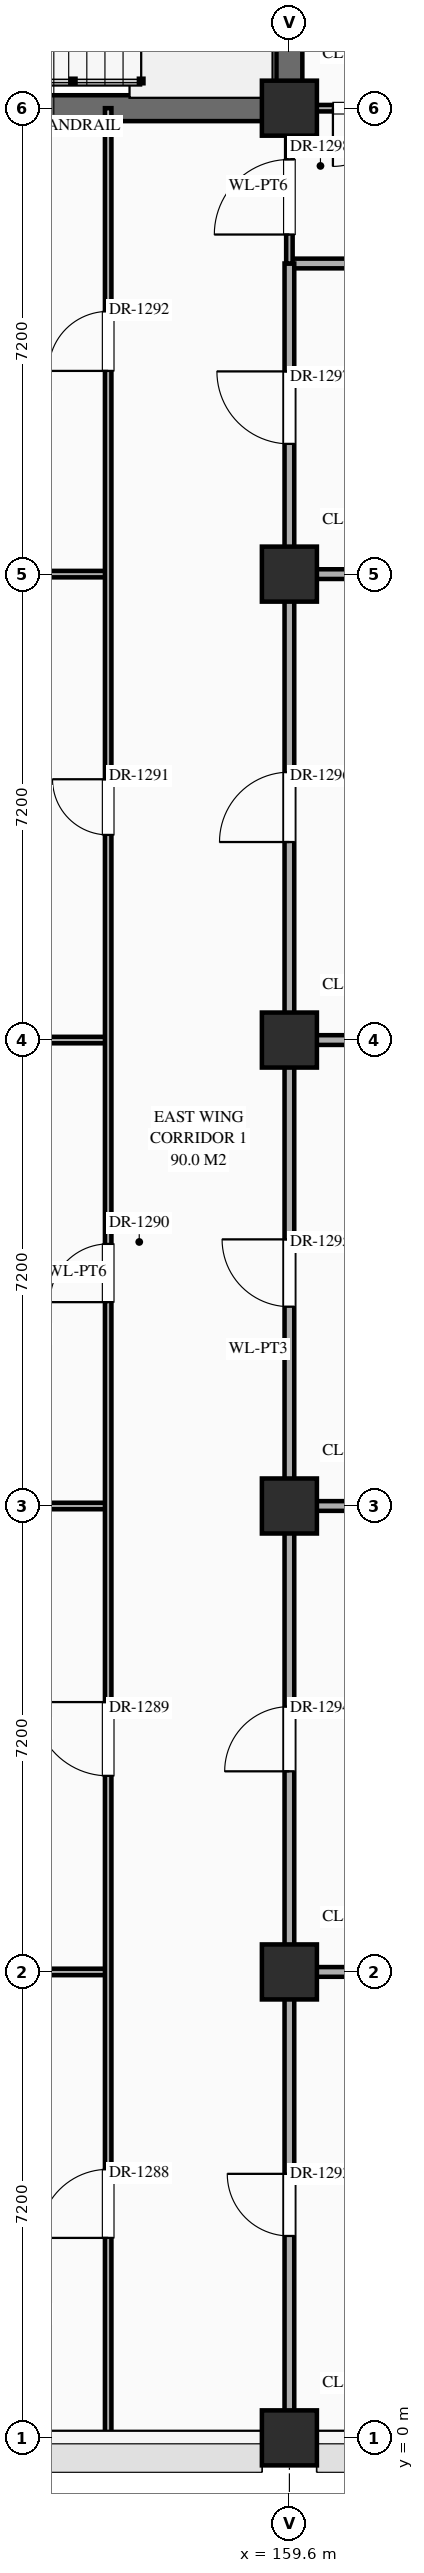
"""IFC4 building model, lengths in metres.
Left out: names, types, materials, properties, quantities, classifications, styles, units other than length and angle.
Written with IfcOpenShell. Run it as: python <this file> out.ifc"""

import sys

from ifc_helpers import new_model, si_unit, direction, frame, frame_2d, origin, origin_2d, place, context, subcontext, project, spatial, rectangle, extrude, element, fill, save


model = new_model("IFC4")
c1 = context("Model", 3, precision=1e-05, world=origin(), true_north=direction((0.0, 1.0)))
c2 = subcontext(c1, "Body", "Model", "MODEL_VIEW")
j1 = project(units=[si_unit("LENGTHUNIT", "METRE"), si_unit("PLANEANGLEUNIT", "RADIAN")], contexts=[c1])
p1 = place(None, origin())
s1 = spatial("IfcSite", under=j1, at=p1, CompositionType="ELEMENT")
p2 = place(p1, origin())
s2 = spatial("IfcBuilding", under=s1, at=p2, CompositionType="ELEMENT")
p3 = place(p2, frame((0.0, 0.0, 5.4)))
s3 = spatial("IfcBuildingStorey", under=s2, at=p3, CompositionType="ELEMENT", Elevation=5.4)
for number, where, z_axis, x_axis in (
    (1, (159.6, 0.0, 0.0), (0.0, 0.0, 1.0), (1.0, 0.0, 0.0)),
    (2, (159.6, 7.2, 0.0), (0.0, 0.0, 1.0), (1.0, 0.0, 0.0)),
    (3, (159.6, 14.4, 0.0), (0.0, 0.0, 1.0), (1.0, 0.0, 0.0)),
    (4, (159.6, 21.6, 0.0), (0.0, 0.0, 1.0), (1.0, 0.0, 0.0)),
    (5, (159.6, 28.8, 0.0), (0.0, 0.0, 1.0), (1.0, 0.0, 0.0)),
    (6, (159.6, 36.0, 0.0), (0.0, 0.0, 1.0), (1.0, 0.0, 0.0)),
):
    element("IfcColumn", number, at=place(p3, frame(where, z_axis=z_axis, x_axis=x_axis)), inside=s3, PredefinedType="COLUMN", context=c2, shape_type="SweptSolid", body=[
        extrude(rectangle(XDim=0.85, YDim=0.85, at=origin_2d()), origin(), (0.0, 0.0, 1.0), 5.4),
    ])
p4 = place(p3, frame((151.24, 7.2, 0.0), z_axis=(0.0, 0.0, 1.0), x_axis=(1.0, 0.0, 0.0)))
e7 = element("IfcWall", 7, at=p4, inside=s3, PredefinedType="STANDARD", context=c2, shape_type="SweptSolid", body=[
    extrude(rectangle(XDim=5.56, YDim=0.1, at=frame_2d((2.78, 0.0))), origin(), (0.0, 0.0, 1.0), 4.2),
])
p5 = place(p3, frame((159.6, 7.2, 0.0), z_axis=(0.0, 0.0, 1.0), x_axis=(1.0, 0.0, 0.0)))
e8 = element("IfcWall", 8, at=p5, inside=s3, PredefinedType="STANDARD", context=c2, shape_type="SweptSolid", body=[
    extrude(rectangle(XDim=8.36, YDim=0.15, at=frame_2d((4.18, 0.0))), origin(), (0.0, 0.0, 1.0), 4.2),
])
p6 = place(p3, frame((151.24, 14.4, 0.0), z_axis=(0.0, 0.0, 1.0), x_axis=(1.0, 0.0, 0.0)))
e9 = element("IfcWall", 9, at=p6, inside=s3, PredefinedType="STANDARD", context=c2, shape_type="SweptSolid", body=[
    extrude(rectangle(XDim=5.56, YDim=0.1, at=frame_2d((2.78, 0.0))), origin(), (0.0, 0.0, 1.0), 4.2),
])
p7 = place(p3, frame((159.6, 14.4, 0.0), z_axis=(0.0, 0.0, 1.0), x_axis=(1.0, 0.0, 0.0)))
e10 = element("IfcWall", 10, at=p7, inside=s3, PredefinedType="STANDARD", context=c2, shape_type="SweptSolid", body=[
    extrude(rectangle(XDim=8.36, YDim=0.15, at=frame_2d((4.18, 0.0))), origin(), (0.0, 0.0, 1.0), 4.2),
])
p8 = place(p3, frame((151.24, 21.6, 0.0), z_axis=(0.0, 0.0, 1.0), x_axis=(1.0, 0.0, 0.0)))
e11 = element("IfcWall", 11, at=p8, inside=s3, PredefinedType="STANDARD", context=c2, shape_type="SweptSolid", body=[
    extrude(rectangle(XDim=5.56, YDim=0.1, at=frame_2d((2.78, 0.0))), origin(), (0.0, 0.0, 1.0), 4.2),
])
p9 = place(p3, frame((159.6, 21.6, 0.0), z_axis=(0.0, 0.0, 1.0), x_axis=(1.0, 0.0, 0.0)))
e12 = element("IfcWall", 12, at=p9, inside=s3, PredefinedType="STANDARD", context=c2, shape_type="SweptSolid", body=[
    extrude(rectangle(XDim=8.36, YDim=0.15, at=frame_2d((4.18, 0.0))), origin(), (0.0, 0.0, 1.0), 4.2),
])
p10 = place(p3, frame((151.24, 28.8, 0.0), z_axis=(0.0, 0.0, 1.0), x_axis=(1.0, 0.0, 0.0)))
e13 = element("IfcWall", 13, at=p10, inside=s3, PredefinedType="STANDARD", context=c2, shape_type="SweptSolid", body=[
    extrude(rectangle(XDim=5.56, YDim=0.1, at=frame_2d((2.78, 0.0))), origin(), (0.0, 0.0, 1.0), 4.2),
])
p11 = place(p3, frame((159.6, 28.8, 0.0), z_axis=(0.0, 0.0, 1.0), x_axis=(1.0, 0.0, 0.0)))
e14 = element("IfcWall", 14, at=p11, inside=s3, PredefinedType="STANDARD", context=c2, shape_type="SweptSolid", body=[
    extrude(rectangle(XDim=8.36, YDim=0.15, at=frame_2d((4.18, 0.0))), origin(), (0.0, 0.0, 1.0), 4.2),
])
p12 = place(p3, frame((159.6, 33.6, 0.0), z_axis=(0.0, 0.0, 1.0), x_axis=(1.0, 0.0, 0.0)))
e15 = element("IfcWall", 15, at=p12, inside=s3, PredefinedType="STANDARD", context=c2, shape_type="SweptSolid", body=[
    extrude(rectangle(XDim=8.36, YDim=0.15, at=frame_2d((4.18, 0.0))), origin(), (0.0, 0.0, 1.0), 5.05),
])
p13 = place(p12, frame((0.92, 0.0, 0.0)))
e16 = element("IfcOpeningElement", 16, at=p13, cuts=e15, PredefinedType="OPENING", context=c2, shape_type="SweptSolid", body=[
    extrude(rectangle(XDim=0.96, YDim=2.2, at=frame_2d((0.48, 1.1))), frame((0.0, 0.087, 0.0), z_axis=(0.0, -1.0, 0.0), x_axis=(1.0, 0.0, 0.0)), (0.0, 0.0, 1.0), 0.174),
])
p14 = place(p3, frame((151.24, 36.0, 0.0), z_axis=(0.0, 0.0, 1.0), x_axis=(1.0, 0.0, 0.0)))
e17 = element("IfcWall", 17, at=p14, inside=s3, PredefinedType="SHEAR", context=c2, shape_type="SweptSolid", body=[
    extrude(rectangle(XDim=8.36, YDim=0.4, at=frame_2d((4.18, 0.0))), origin(), (0.0, 0.0, 1.0), 5.05),
])
p15 = place(p3, frame((159.6, 36.0, 0.0), z_axis=(0.0, 0.0, 1.0), x_axis=(1.0, 0.0, 0.0)))
e18 = element("IfcWall", 18, at=p15, inside=s3, PredefinedType="STANDARD", context=c2, shape_type="SweptSolid", body=[
    extrude(rectangle(XDim=8.36, YDim=0.1, at=frame_2d((4.18, 0.0))), origin(), (0.0, 0.0, 1.0), 4.2),
])
p16 = place(p15, frame((0.673, 0.0, 0.0)))
e19 = element("IfcOpeningElement", 19, at=p16, cuts=e18, PredefinedType="OPENING", context=c2, shape_type="SweptSolid", body=[
    extrude(rectangle(XDim=1.8, YDim=2.5, at=frame_2d((0.9, 1.25))), frame((0.0, 0.062, 0.0), z_axis=(0.0, -1.0, 0.0), x_axis=(1.0, 0.0, 0.0)), (0.0, 0.0, 1.0), 0.124),
])
p17 = place(p3, frame((156.8, 0.04, 0.0), z_axis=(0.0, 0.0, 1.0), x_axis=(0.0, 1.0, 0.0)))
e20 = element("IfcWall", 20, at=p17, inside=s3, PredefinedType="STANDARD", context=c2, shape_type="SweptSolid", body=[
    extrude(rectangle(XDim=35.96, YDim=0.1, at=frame_2d((17.98, 0.0))), origin(), (0.0, 0.0, 1.0), 5.05),
])
p18 = place(p17, frame((3.05, 0.0, 0.0)))
e21 = element("IfcOpeningElement", 21, at=p18, cuts=e20, PredefinedType="OPENING", context=c2, shape_type="SweptSolid", body=[
    extrude(rectangle(XDim=1.06, YDim=2.4, at=frame_2d((0.53, 1.2))), frame((0.0, 0.062, 0.0), z_axis=(0.0, -1.0, 0.0), x_axis=(1.0, 0.0, 0.0)), (0.0, 0.0, 1.0), 0.124),
])
p19 = place(p17, frame((10.19, 0.0, 0.0)))
e22 = element("IfcOpeningElement", 22, at=p19, cuts=e20, PredefinedType="OPENING", context=c2, shape_type="SweptSolid", body=[
    extrude(rectangle(XDim=1.14, YDim=2.4, at=frame_2d((0.57, 1.2))), frame((0.0, 0.062, 0.0), z_axis=(0.0, -1.0, 0.0), x_axis=(1.0, 0.0, 0.0)), (0.0, 0.0, 1.0), 0.124),
])
p20 = place(p17, frame((17.51, 0.0, 0.0)))
e23 = element("IfcOpeningElement", 23, at=p20, cuts=e20, PredefinedType="OPENING", context=c2, shape_type="SweptSolid", body=[
    extrude(rectangle(XDim=0.9, YDim=2.15, at=frame_2d((0.45, 1.075))), frame((0.0, 0.062, 0.0), z_axis=(0.0, -1.0, 0.0), x_axis=(1.0, 0.0, 0.0)), (0.0, 0.0, 1.0), 0.124),
])
p21 = place(p17, frame((24.73, 0.0, 0.0)))
e24 = element("IfcOpeningElement", 24, at=p21, cuts=e20, PredefinedType="OPENING", context=c2, shape_type="SweptSolid", body=[
    extrude(rectangle(XDim=0.86, YDim=2.1, at=frame_2d((0.43, 1.05))), frame((0.0, 0.062, 0.0), z_axis=(0.0, -1.0, 0.0), x_axis=(1.0, 0.0, 0.0)), (0.0, 0.0, 1.0), 0.124),
])
p22 = place(p17, frame((31.9, 0.0, 0.0)))
e25 = element("IfcOpeningElement", 25, at=p22, cuts=e20, PredefinedType="OPENING", context=c2, shape_type="SweptSolid", body=[
    extrude(rectangle(XDim=0.92, YDim=2.15, at=frame_2d((0.46, 1.075))), frame((0.0, 0.062, 0.0), z_axis=(0.0, -1.0, 0.0), x_axis=(1.0, 0.0, 0.0)), (0.0, 0.0, 1.0), 0.124),
])
p23 = place(p3, frame((159.6, 0.04, 0.0), z_axis=(0.0, 0.0, 1.0), x_axis=(0.0, 1.0, 0.0)))
e26 = element("IfcWall", 26, at=p23, inside=s3, PredefinedType="STANDARD", context=c2, shape_type="SweptSolid", body=[
    extrude(rectangle(XDim=33.56, YDim=0.15, at=frame_2d((16.78, 0.0))), origin(), (0.0, 0.0, 1.0), 4.3),
])
p24 = place(p23, frame((3.08, 0.0, 0.0)))
e27 = element("IfcOpeningElement", 27, at=p24, cuts=e26, PredefinedType="OPENING", context=c2, shape_type="SweptSolid", body=[
    extrude(rectangle(XDim=0.96, YDim=2.2, at=frame_2d((0.48, 1.1))), frame((0.0, 0.087, 0.0), z_axis=(0.0, -1.0, 0.0), x_axis=(1.0, 0.0, 0.0)), (0.0, 0.0, 1.0), 0.174),
])
p25 = place(p23, frame((10.26, 0.0, 0.0)))
e28 = element("IfcOpeningElement", 28, at=p25, cuts=e26, PredefinedType="OPENING", context=c2, shape_type="SweptSolid", body=[
    extrude(rectangle(XDim=1.0, YDim=2.25, at=frame_2d((0.5, 1.125))), frame((0.0, 0.087, 0.0), z_axis=(0.0, -1.0, 0.0), x_axis=(1.0, 0.0, 0.0)), (0.0, 0.0, 1.0), 0.174),
])
p26 = place(p23, frame((17.44, 0.0, 0.0)))
e29 = element("IfcOpeningElement", 29, at=p26, cuts=e26, PredefinedType="OPENING", context=c2, shape_type="SweptSolid", body=[
    extrude(rectangle(XDim=1.04, YDim=2.2, at=frame_2d((0.52, 1.1))), frame((0.0, 0.087, 0.0), z_axis=(0.0, -1.0, 0.0), x_axis=(1.0, 0.0, 0.0)), (0.0, 0.0, 1.0), 0.174),
])
p27 = place(p23, frame((24.62, 0.0, 0.0)))
e30 = element("IfcOpeningElement", 30, at=p27, cuts=e26, PredefinedType="OPENING", context=c2, shape_type="SweptSolid", body=[
    extrude(rectangle(XDim=1.08, YDim=2.25, at=frame_2d((0.54, 1.125))), frame((0.0, 0.087, 0.0), z_axis=(0.0, -1.0, 0.0), x_axis=(1.0, 0.0, 0.0)), (0.0, 0.0, 1.0), 0.174),
])
p28 = place(p23, frame((30.772, 0.0, 0.0)))
e31 = element("IfcOpeningElement", 31, at=p28, cuts=e26, PredefinedType="OPENING", context=c2, shape_type="SweptSolid", body=[
    extrude(rectangle(XDim=1.12, YDim=2.25, at=frame_2d((0.56, 1.125))), frame((0.0, 0.087, 0.0), z_axis=(0.0, -1.0, 0.0), x_axis=(1.0, 0.0, 0.0)), (0.0, 0.0, 1.0), 0.174),
])
p29 = place(p3, frame((159.6, 33.6, 0.0), z_axis=(0.0, 0.0, 1.0), x_axis=(0.0, 1.0, 0.0)))
e32 = element("IfcWall", 32, at=p29, inside=s3, PredefinedType="STANDARD", context=c2, shape_type="SweptSolid", body=[
    extrude(rectangle(XDim=2.4, YDim=0.1, at=frame_2d((1.2, 0.0))), origin(), (0.0, 0.0, 1.0), 4.3),
])
p30 = place(p29, frame((0.448, 0.0, 0.0)))
e33 = element("IfcOpeningElement", 33, at=p30, cuts=e32, PredefinedType="OPENING", context=c2, shape_type="SweptSolid", body=[
    extrude(rectangle(XDim=1.16, YDim=2.3, at=frame_2d((0.58, 1.15))), frame((0.0, 0.062, 0.0), z_axis=(0.0, -1.0, 0.0), x_axis=(1.0, 0.0, 0.0)), (0.0, 0.0, 1.0), 0.124),
])
p31 = place(p3, frame((159.6, 36.0, 0.0), z_axis=(0.0, 0.0, 1.0), x_axis=(0.0, 1.0, 0.0)))
e34 = element("IfcWall", 34, at=p31, inside=s3, PredefinedType="SHEAR", context=c2, shape_type="SweptSolid", body=[
    extrude(rectangle(XDim=4.8, YDim=0.4, at=frame_2d((2.4, 0.0))), origin(), (0.0, 0.0, 1.0), 5.12),
])
p32 = place(p18, origin())
e35 = element("IfcDoor", 35, at=p32, inside=s3, OperationType="SINGLE_SWING_LEFT", PredefinedType="DOOR", context=c2, shape_type="SweptSolid", body=[
    extrude(rectangle(XDim=1.06, YDim=2.4, at=frame_2d((0.53, 1.2))), frame((0.0, 0.025, 0.0), z_axis=(0.0, -1.0, 0.0), x_axis=(1.0, 0.0, 0.0)), (0.0, 0.0, 1.0), 0.05),
])
fill(e21, e35)
p33 = place(p19, origin())
e36 = element("IfcDoor", 36, at=p33, inside=s3, OperationType="SINGLE_SWING_RIGHT", PredefinedType="DOOR", context=c2, shape_type="SweptSolid", body=[
    extrude(rectangle(XDim=1.14, YDim=2.4, at=frame_2d((0.57, 1.2))), frame((0.0, 0.025, 0.0), z_axis=(0.0, -1.0, 0.0), x_axis=(1.0, 0.0, 0.0)), (0.0, 0.0, 1.0), 0.05),
])
fill(e22, e36)
p34 = place(p20, origin())
e37 = element("IfcDoor", 37, at=p34, inside=s3, OperationType="SINGLE_SWING_LEFT", PredefinedType="DOOR", context=c2, shape_type="SweptSolid", body=[
    extrude(rectangle(XDim=0.9, YDim=2.15, at=frame_2d((0.45, 1.075))), frame((0.0, 0.025, 0.0), z_axis=(0.0, -1.0, 0.0), x_axis=(1.0, 0.0, 0.0)), (0.0, 0.0, 1.0), 0.05),
])
fill(e23, e37)
p35 = place(p21, origin())
e38 = element("IfcDoor", 38, at=p35, inside=s3, OperationType="SINGLE_SWING_RIGHT", PredefinedType="DOOR", context=c2, shape_type="SweptSolid", body=[
    extrude(rectangle(XDim=0.86, YDim=2.1, at=frame_2d((0.43, 1.05))), frame((0.0, 0.025, 0.0), z_axis=(0.0, -1.0, 0.0), x_axis=(1.0, 0.0, 0.0)), (0.0, 0.0, 1.0), 0.05),
])
fill(e24, e38)
p36 = place(p22, origin())
e39 = element("IfcDoor", 39, at=p36, inside=s3, OperationType="SINGLE_SWING_LEFT", PredefinedType="DOOR", context=c2, shape_type="SweptSolid", body=[
    extrude(rectangle(XDim=0.92, YDim=2.15, at=frame_2d((0.46, 1.075))), frame((0.0, 0.025, 0.0), z_axis=(0.0, -1.0, 0.0), x_axis=(1.0, 0.0, 0.0)), (0.0, 0.0, 1.0), 0.05),
])
fill(e25, e39)
p37 = place(p24, origin())
e40 = element("IfcDoor", 40, at=p37, inside=s3, OperationType="SINGLE_SWING_RIGHT", PredefinedType="DOOR", context=c2, shape_type="SweptSolid", body=[
    extrude(rectangle(XDim=0.96, YDim=2.2, at=frame_2d((0.48, 1.1))), frame((0.0, 0.025, 0.0), z_axis=(0.0, -1.0, 0.0), x_axis=(1.0, 0.0, 0.0)), (0.0, 0.0, 1.0), 0.05),
])
fill(e27, e40)
p38 = place(p25, origin())
e41 = element("IfcDoor", 41, at=p38, inside=s3, OperationType="SINGLE_SWING_LEFT", PredefinedType="DOOR", context=c2, shape_type="SweptSolid", body=[
    extrude(rectangle(XDim=1.0, YDim=2.25, at=frame_2d((0.5, 1.125))), frame((0.0, 0.025, 0.0), z_axis=(0.0, -1.0, 0.0), x_axis=(1.0, 0.0, 0.0)), (0.0, 0.0, 1.0), 0.05),
])
fill(e28, e41)
p39 = place(p26, origin())
e42 = element("IfcDoor", 42, at=p39, inside=s3, OperationType="SINGLE_SWING_RIGHT", PredefinedType="DOOR", context=c2, shape_type="SweptSolid", body=[
    extrude(rectangle(XDim=1.04, YDim=2.2, at=frame_2d((0.52, 1.1))), frame((0.0, 0.025, 0.0), z_axis=(0.0, -1.0, 0.0), x_axis=(1.0, 0.0, 0.0)), (0.0, 0.0, 1.0), 0.05),
])
fill(e29, e42)
p40 = place(p27, origin())
e43 = element("IfcDoor", 43, at=p40, inside=s3, OperationType="SINGLE_SWING_LEFT", PredefinedType="DOOR", context=c2, shape_type="SweptSolid", body=[
    extrude(rectangle(XDim=1.08, YDim=2.25, at=frame_2d((0.54, 1.125))), frame((0.0, 0.025, 0.0), z_axis=(0.0, -1.0, 0.0), x_axis=(1.0, 0.0, 0.0)), (0.0, 0.0, 1.0), 0.05),
])
fill(e30, e43)
p41 = place(p28, origin())
e44 = element("IfcDoor", 44, at=p41, inside=s3, OperationType="SINGLE_SWING_RIGHT", PredefinedType="DOOR", context=c2, shape_type="SweptSolid", body=[
    extrude(rectangle(XDim=1.12, YDim=2.25, at=frame_2d((0.56, 1.125))), frame((0.0, 0.025, 0.0), z_axis=(0.0, -1.0, 0.0), x_axis=(1.0, 0.0, 0.0)), (0.0, 0.0, 1.0), 0.05),
])
fill(e31, e44)
p42 = place(p30, origin())
e45 = element("IfcDoor", 45, at=p42, inside=s3, OperationType="SINGLE_SWING_LEFT", PredefinedType="DOOR", context=c2, shape_type="SweptSolid", body=[
    extrude(rectangle(XDim=1.16, YDim=2.3, at=frame_2d((0.58, 1.15))), frame((0.0, 0.025, 0.0), z_axis=(0.0, -1.0, 0.0), x_axis=(1.0, 0.0, 0.0)), (0.0, 0.0, 1.0), 0.05),
])
fill(e33, e45)
p43 = place(p16, frame((1.8, 0.0, 0.0), z_axis=(0.0, 0.0, 1.0), x_axis=(-1.0, 0.0, 0.0)))
e46 = element("IfcDoor", 46, at=p43, inside=s3, OperationType="DOUBLE_DOOR_SINGLE_SWING", PredefinedType="DOOR", context=c2, shape_type="SweptSolid", body=[
    extrude(rectangle(XDim=1.8, YDim=2.5, at=frame_2d((0.9, 1.25))), frame((0.0, 0.025, 0.0), z_axis=(0.0, -1.0, 0.0), x_axis=(1.0, 0.0, 0.0)), (0.0, 0.0, 1.0), 0.05),
])
fill(e19, e46)
save(model, sys.argv[1])
